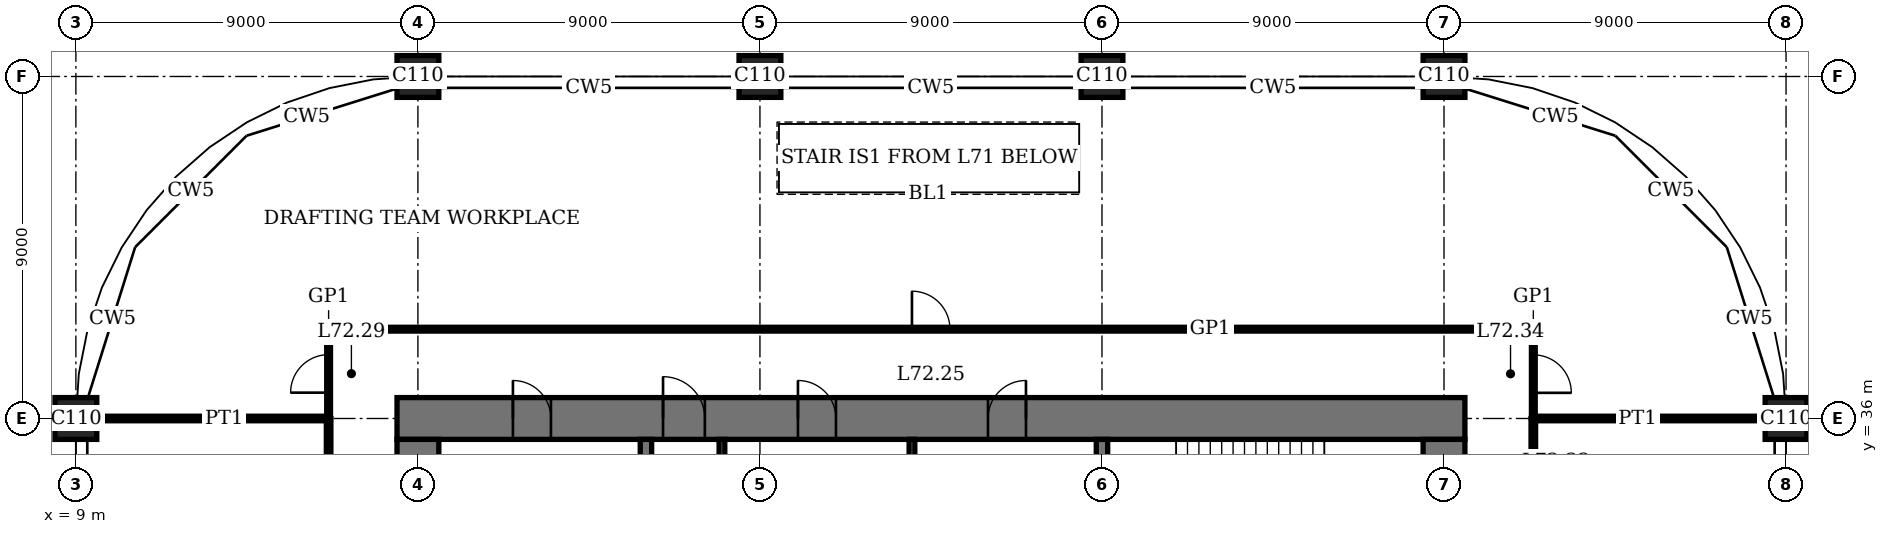
"""IFC4 building model, lengths in metres.
Left out: names, types, materials, properties, quantities, classifications, styles, units other than length and angle.
Written with IfcOpenShell. Run it as: python <this file> out.ifc"""

import sys

from ifc_helpers import new_model, si_unit, direction, frame, frame_2d, origin, origin_2d, place, context, subcontext, project, spatial, rectangle, extrude, element, fill, save


model = new_model("IFC4")
c1 = context("Model", 3, precision=1e-05, world=origin(), true_north=direction((0.0, 1.0)))
c2 = subcontext(c1, "Body", "Model", "MODEL_VIEW")
j1 = project(units=[si_unit("LENGTHUNIT", "METRE"), si_unit("PLANEANGLEUNIT", "RADIAN")], contexts=[c1])
p1 = place(None, origin())
s1 = spatial("IfcSite", under=j1, at=p1, CompositionType="ELEMENT")
p2 = place(p1, origin())
s2 = spatial("IfcBuilding", under=s1, at=p2, CompositionType="ELEMENT")
p3 = place(p2, frame((0.0, 0.0, 295.4)))
s3 = spatial("IfcBuildingStorey", under=s2, at=p3, CompositionType="ELEMENT", Elevation=295.4)
for number, where, z_axis, x_axis in (
    (1, (9.0, 36.0, 0.0), (0.0, 0.0, 1.0), (1.0, 0.0, 0.0)),
    (2, (18.0, 45.0, 0.0), (0.0, 0.0, 1.0), (1.0, 0.0, 0.0)),
    (3, (27.0, 45.0, 0.0), (0.0, 0.0, 1.0), (1.0, 0.0, 0.0)),
    (4, (36.0, 45.0, 0.0), (0.0, 0.0, 1.0), (1.0, 0.0, 0.0)),
    (5, (45.0, 45.0, 0.0), (0.0, 0.0, 1.0), (1.0, 0.0, 0.0)),
    (6, (54.0, 36.0, 0.0), (0.0, 0.0, 1.0), (1.0, 0.0, 0.0)),
):
    element("IfcColumn", number, at=place(p3, frame(where, z_axis=z_axis, x_axis=x_axis)), inside=s3, PredefinedType="COLUMN", context=c2, shape_type="SweptSolid", body=[
        extrude(rectangle(XDim=1.1, YDim=1.1, at=origin_2d()), origin(), (0.0, 0.0, 1.0), 4.0),
    ])
p4 = place(p3, frame((45.55, 36.0, 0.0), z_axis=(0.0, 0.0, 1.0), x_axis=(-1.0, 0.0, 0.0)))
e7 = element("IfcWall", 7, at=p4, inside=s3, PredefinedType="SHEAR", context=c2, shape_type="SweptSolid", body=[
    extrude(rectangle(XDim=28.1, YDim=1.1, at=frame_2d((14.05, 0.0))), origin(), (0.0, 0.0, 1.0), 4.0),
])
p5 = place(p4, frame((11.55, 0.0, 0.0)))
e8 = element("IfcOpeningElement", 8, at=p5, cuts=e7, PredefinedType="OPENING", context=c2, shape_type="SweptSolid", body=[
    extrude(rectangle(XDim=1.0, YDim=2.4, at=frame_2d((0.5, 1.2))), frame((0.0, 0.56, 0.0), z_axis=(0.0, -1.0, 0.0), x_axis=(1.0, 0.0, 0.0)), (0.0, 0.0, 1.0), 1.12),
])
p6 = place(p4, frame((16.55, 0.0, 0.0)))
e9 = element("IfcOpeningElement", 9, at=p6, cuts=e7, PredefinedType="OPENING", context=c2, shape_type="SweptSolid", body=[
    extrude(rectangle(XDim=1.0, YDim=2.4, at=frame_2d((0.5, 1.2))), frame((0.0, 0.56, 0.0), z_axis=(0.0, -1.0, 0.0), x_axis=(1.0, 0.0, 0.0)), (0.0, 0.0, 1.0), 1.12),
])
p7 = place(p4, frame((20.0, 0.0, 0.0)))
e10 = element("IfcOpeningElement", 10, at=p7, cuts=e7, PredefinedType="OPENING", context=c2, shape_type="SweptSolid", body=[
    extrude(rectangle(XDim=1.1, YDim=2.4, at=frame_2d((0.55, 1.2))), frame((0.0, 0.56, 0.0), z_axis=(0.0, -1.0, 0.0), x_axis=(1.0, 0.0, 0.0)), (0.0, 0.0, 1.0), 1.12),
])
p8 = place(p4, frame((24.05, 0.0, 0.0)))
e11 = element("IfcOpeningElement", 11, at=p8, cuts=e7, PredefinedType="OPENING", context=c2, shape_type="SweptSolid", body=[
    extrude(rectangle(XDim=1.0, YDim=2.4, at=frame_2d((0.5, 1.2))), frame((0.0, 0.56, 0.0), z_axis=(0.0, -1.0, 0.0), x_axis=(1.0, 0.0, 0.0)), (0.0, 0.0, 1.0), 1.12),
])
p9 = place(p3, frame((18.0, 35.45, 0.0), z_axis=(0.0, 0.0, 1.0), x_axis=(0.0, -1.0, 0.0)))
e12 = element("IfcWall", 12, at=p9, inside=s3, PredefinedType="SHEAR", context=c2, shape_type="SweptSolid", body=[
    extrude(rectangle(XDim=16.9, YDim=1.1, at=frame_2d((8.45, 0.0))), origin(), (0.0, 0.0, 1.0), 4.0),
])
p10 = place(p9, frame((8.45, 0.0, 0.0)))
e13 = element("IfcOpeningElement", 13, at=p10, cuts=e12, PredefinedType="OPENING", context=c2, shape_type="SweptSolid", body=[
    extrude(rectangle(XDim=1.8, YDim=2.4, at=frame_2d((0.9, 1.2))), frame((0.0, 0.56, 0.0), z_axis=(0.0, -1.0, 0.0), x_axis=(1.0, 0.0, 0.0)), (0.0, 0.0, 1.0), 1.12),
])
p11 = place(p3, frame((45.0, 18.55, 0.0), z_axis=(0.0, 0.0, 1.0), x_axis=(0.0, 1.0, 0.0)))
e14 = element("IfcWall", 14, at=p11, inside=s3, PredefinedType="SHEAR", context=c2, shape_type="SweptSolid", body=[
    extrude(rectangle(XDim=16.9, YDim=1.1, at=frame_2d((8.45, 0.0))), origin(), (0.0, 0.0, 1.0), 4.0),
])
p12 = place(p11, frame((8.45, 0.0, 0.0)))
e15 = element("IfcOpeningElement", 15, at=p12, cuts=e14, PredefinedType="OPENING", context=c2, shape_type="SweptSolid", body=[
    extrude(rectangle(XDim=1.8, YDim=2.4, at=frame_2d((0.9, 1.2))), frame((0.0, 0.56, 0.0), z_axis=(0.0, -1.0, 0.0), x_axis=(1.0, 0.0, 0.0)), (0.0, 0.0, 1.0), 1.12),
])
p13 = place(p3, frame((36.0, 32.4, 0.0), z_axis=(0.0, 0.0, 1.0), x_axis=(0.0, 1.0, 0.0)))
e16 = element("IfcWall", 16, at=p13, inside=s3, PredefinedType="SHEAR", context=c2, shape_type="SweptSolid", body=[
    extrude(rectangle(XDim=3.05, YDim=0.3, at=frame_2d((1.525, 0.0))), origin(), (0.0, 0.0, 1.0), 4.0),
])
p14 = place(p3, frame((24.0, 29.55, 0.0), z_axis=(0.0, 0.0, 1.0), x_axis=(0.0, 1.0, 0.0)))
e17 = element("IfcWall", 17, at=p14, inside=s3, PredefinedType="SHEAR", context=c2, shape_type="SweptSolid", body=[
    extrude(rectangle(XDim=5.9, YDim=0.3, at=frame_2d((2.95, 0.0))), origin(), (0.0, 0.0, 1.0), 4.0),
])
for number, where, z_axis, x_axis in (
    (18, (9.55, 36.0, 0.0), (0.0, 0.0, 1.0), (1.0, 0.0, 0.0)),
    (19, (47.35, 36.0, 0.0), (0.0, 0.0, 1.0), (1.0, 0.0, 0.0)),
):
    element("IfcWall", number, at=place(p3, frame(where, z_axis=z_axis, x_axis=x_axis)), inside=s3, PredefinedType="PARTITIONING", context=c2, shape_type="SweptSolid", body=[
        extrude(rectangle(XDim=6.1, YDim=0.12, at=frame_2d((3.05, 0.0))), origin(), (0.0, 0.0, 1.0), 3.05),
    ])
p15 = place(p3, frame((15.6, 38.35, 0.0), z_axis=(0.0, 0.0, 1.0), x_axis=(1.0, 0.0, 0.0)))
e20 = element("IfcWall", 20, at=p15, inside=s3, PredefinedType="PARTITIONING", context=c2, shape_type="SweptSolid", body=[
    extrude(rectangle(XDim=31.8, YDim=0.1, at=frame_2d((15.9, 0.0))), origin(), (0.0, 0.0, 1.0), 3.75),
])
p16 = place(p15, frame((15.4, 0.0, 0.0)))
e21 = element("IfcOpeningElement", 21, at=p16, cuts=e20, PredefinedType="OPENING", context=c2, shape_type="SweptSolid", body=[
    extrude(rectangle(XDim=1.0, YDim=2.4, at=frame_2d((0.5, 1.2))), frame((0.0, 0.06, 0.0), z_axis=(0.0, -1.0, 0.0), x_axis=(1.0, 0.0, 0.0)), (0.0, 0.0, 1.0), 0.12),
])
p17 = place(p3, frame((15.65, 27.0, 0.0), z_axis=(0.0, 0.0, 1.0), x_axis=(0.0, 1.0, 0.0)))
e22 = element("IfcWall", 22, at=p17, inside=s3, PredefinedType="PARTITIONING", context=c2, shape_type="SweptSolid", body=[
    extrude(rectangle(XDim=9.0, YDim=0.12, at=frame_2d((4.5, 0.0))), origin(), (0.0, 0.0, 1.0), 3.75),
])
p18 = place(p17, frame((4.0, 0.0, 0.0)))
e23 = element("IfcOpeningElement", 23, at=p18, cuts=e22, PredefinedType="OPENING", context=c2, shape_type="SweptSolid", body=[
    extrude(rectangle(XDim=1.0, YDim=2.4, at=frame_2d((0.5, 1.2))), frame((0.0, 0.07, 0.0), z_axis=(0.0, -1.0, 0.0), x_axis=(1.0, 0.0, 0.0)), (0.0, 0.0, 1.0), 0.14),
])
p19 = place(p3, frame((15.65, 36.01, 0.0), z_axis=(0.0, 0.0, 1.0), x_axis=(0.0, 1.0, 0.0)))
e24 = element("IfcWall", 24, at=p19, inside=s3, PredefinedType="PARTITIONING", context=c2, shape_type="SweptSolid", body=[
    extrude(rectangle(XDim=2.34, YDim=0.1, at=frame_2d((1.17, 0.0))), origin(), (0.0, 0.0, 1.0), 3.75),
])
p20 = place(p19, frame((0.67, 0.0, 0.0)))
e25 = element("IfcOpeningElement", 25, at=p20, cuts=e24, PredefinedType="OPENING", context=c2, shape_type="SweptSolid", body=[
    extrude(rectangle(XDim=1.0, YDim=2.4, at=frame_2d((0.5, 1.2))), frame((0.0, 0.06, 0.0), z_axis=(0.0, -1.0, 0.0), x_axis=(1.0, 0.0, 0.0)), (0.0, 0.0, 1.0), 0.12),
])
p21 = place(p3, frame((47.35, 31.5, 0.0), z_axis=(0.0, 0.0, 1.0), x_axis=(0.0, 1.0, 0.0)))
e26 = element("IfcWall", 26, at=p21, inside=s3, PredefinedType="PARTITIONING", context=c2, shape_type="SweptSolid", body=[
    extrude(rectangle(XDim=4.5, YDim=0.12, at=frame_2d((2.25, 0.0))), origin(), (0.0, 0.0, 1.0), 3.75),
])
p22 = place(p21, frame((1.75, 0.0, 0.0)))
e27 = element("IfcOpeningElement", 27, at=p22, cuts=e26, PredefinedType="OPENING", context=c2, shape_type="SweptSolid", body=[
    extrude(rectangle(XDim=1.0, YDim=2.4, at=frame_2d((0.5, 1.2))), frame((0.0, 0.07, 0.0), z_axis=(0.0, -1.0, 0.0), x_axis=(1.0, 0.0, 0.0)), (0.0, 0.0, 1.0), 0.14),
])
p23 = place(p3, frame((47.35, 36.0, 0.0), z_axis=(0.0, 0.0, 1.0), x_axis=(0.0, 1.0, 0.0)))
e28 = element("IfcWall", 28, at=p23, inside=s3, PredefinedType="PARTITIONING", context=c2, shape_type="SweptSolid", body=[
    extrude(rectangle(XDim=2.35, YDim=0.1, at=frame_2d((1.175, 0.0))), origin(), (0.0, 0.0, 1.0), 3.75),
])
p24 = place(p23, frame((0.675, 0.0, 0.0)))
e29 = element("IfcOpeningElement", 29, at=p24, cuts=e28, PredefinedType="OPENING", context=c2, shape_type="SweptSolid", body=[
    extrude(rectangle(XDim=1.0, YDim=2.4, at=frame_2d((0.5, 1.2))), frame((0.0, 0.06, 0.0), z_axis=(0.0, -1.0, 0.0), x_axis=(1.0, 0.0, 0.0)), (0.0, 0.0, 1.0), 0.12),
])
for number, where, z_axis, x_axis in (
    (30, (31.0, 32.55, 0.0), (0.0, 0.0, 1.0), (0.0, 1.0, 0.0)),
    (31, (26.0, 32.55, 0.0), (0.0, 0.0, 1.0), (0.0, 1.0, 0.0)),
):
    element("IfcWall", number, at=place(p3, frame(where, z_axis=z_axis, x_axis=x_axis)), inside=s3, PredefinedType="PARTITIONING", context=c2, shape_type="SweptSolid", body=[
        extrude(rectangle(XDim=2.9, YDim=0.15, at=frame_2d((1.45, 0.0))), origin(), (0.0, 0.0, 1.0), 3.75),
    ])
p25 = place(p5, origin())
e32 = element("IfcDoor", 32, at=p25, inside=s3, OperationType="SINGLE_SWING_LEFT", PredefinedType="DOOR", context=c2, shape_type="SweptSolid", body=[
    extrude(rectangle(XDim=1.0, YDim=2.4, at=frame_2d((0.5, 1.2))), frame((0.0, 0.025, 0.0), z_axis=(0.0, -1.0, 0.0), x_axis=(1.0, 0.0, 0.0)), (0.0, 0.0, 1.0), 0.05),
    extrude(rectangle(XDim=0.04, YDim=2.4, at=frame_2d((0.02, 1.2))), frame((0.0, 0.4, 0.0), z_axis=(0.0, -1.0, 0.0), x_axis=(1.0, 0.0, 0.0)), (0.0, 0.0, 1.0), 0.8),
    extrude(rectangle(XDim=0.04, YDim=2.4, at=frame_2d((0.98, 1.2))), frame((0.0, 0.4, 0.0), z_axis=(0.0, -1.0, 0.0), x_axis=(1.0, 0.0, 0.0)), (0.0, 0.0, 1.0), 0.8),
    extrude(rectangle(XDim=1.0, YDim=0.04, at=frame_2d((0.5, 2.38))), frame((0.0, 0.4, 0.0), z_axis=(0.0, -1.0, 0.0), x_axis=(1.0, 0.0, 0.0)), (0.0, 0.0, 1.0), 0.8),
])
fill(e8, e32)
p26 = place(p6, origin())
e33 = element("IfcDoor", 33, at=p26, inside=s3, OperationType="SINGLE_SWING_RIGHT", PredefinedType="DOOR", context=c2, shape_type="SweptSolid", body=[
    extrude(rectangle(XDim=1.0, YDim=2.4, at=frame_2d((0.5, 1.2))), frame((0.0, 0.025, 0.0), z_axis=(0.0, -1.0, 0.0), x_axis=(1.0, 0.0, 0.0)), (0.0, 0.0, 1.0), 0.05),
    extrude(rectangle(XDim=0.04, YDim=2.4, at=frame_2d((0.02, 1.2))), frame((0.0, 0.4, 0.0), z_axis=(0.0, -1.0, 0.0), x_axis=(1.0, 0.0, 0.0)), (0.0, 0.0, 1.0), 0.8),
    extrude(rectangle(XDim=0.04, YDim=2.4, at=frame_2d((0.98, 1.2))), frame((0.0, 0.4, 0.0), z_axis=(0.0, -1.0, 0.0), x_axis=(1.0, 0.0, 0.0)), (0.0, 0.0, 1.0), 0.8),
    extrude(rectangle(XDim=1.0, YDim=0.04, at=frame_2d((0.5, 2.38))), frame((0.0, 0.4, 0.0), z_axis=(0.0, -1.0, 0.0), x_axis=(1.0, 0.0, 0.0)), (0.0, 0.0, 1.0), 0.8),
])
fill(e9, e33)
p27 = place(p7, origin())
e34 = element("IfcDoor", 34, at=p27, inside=s3, OperationType="SINGLE_SWING_RIGHT", PredefinedType="DOOR", context=c2, shape_type="SweptSolid", body=[
    extrude(rectangle(XDim=1.1, YDim=2.4, at=frame_2d((0.55, 1.2))), frame((0.0, 0.025, 0.0), z_axis=(0.0, -1.0, 0.0), x_axis=(1.0, 0.0, 0.0)), (0.0, 0.0, 1.0), 0.05),
    extrude(rectangle(XDim=0.04, YDim=2.4, at=frame_2d((0.02, 1.2))), frame((0.0, 0.44, 0.0), z_axis=(0.0, -1.0, 0.0), x_axis=(1.0, 0.0, 0.0)), (0.0, 0.0, 1.0), 0.88),
    extrude(rectangle(XDim=0.04, YDim=2.4, at=frame_2d((1.08, 1.2))), frame((0.0, 0.44, 0.0), z_axis=(0.0, -1.0, 0.0), x_axis=(1.0, 0.0, 0.0)), (0.0, 0.0, 1.0), 0.88),
    extrude(rectangle(XDim=1.1, YDim=0.04, at=frame_2d((0.55, 2.38))), frame((0.0, 0.44, 0.0), z_axis=(0.0, -1.0, 0.0), x_axis=(1.0, 0.0, 0.0)), (0.0, 0.0, 1.0), 0.88),
])
fill(e10, e34)
p28 = place(p8, origin())
e35 = element("IfcDoor", 35, at=p28, inside=s3, OperationType="SINGLE_SWING_RIGHT", PredefinedType="DOOR", context=c2, shape_type="SweptSolid", body=[
    extrude(rectangle(XDim=1.0, YDim=2.4, at=frame_2d((0.5, 1.2))), frame((0.0, 0.025, 0.0), z_axis=(0.0, -1.0, 0.0), x_axis=(1.0, 0.0, 0.0)), (0.0, 0.0, 1.0), 0.05),
    extrude(rectangle(XDim=0.04, YDim=2.4, at=frame_2d((0.02, 1.2))), frame((0.0, 0.4, 0.0), z_axis=(0.0, -1.0, 0.0), x_axis=(1.0, 0.0, 0.0)), (0.0, 0.0, 1.0), 0.8),
    extrude(rectangle(XDim=0.04, YDim=2.4, at=frame_2d((0.98, 1.2))), frame((0.0, 0.4, 0.0), z_axis=(0.0, -1.0, 0.0), x_axis=(1.0, 0.0, 0.0)), (0.0, 0.0, 1.0), 0.8),
    extrude(rectangle(XDim=1.0, YDim=0.04, at=frame_2d((0.5, 2.38))), frame((0.0, 0.4, 0.0), z_axis=(0.0, -1.0, 0.0), x_axis=(1.0, 0.0, 0.0)), (0.0, 0.0, 1.0), 0.8),
])
fill(e11, e35)
p29 = place(p16, origin())
e36 = element("IfcDoor", 36, at=p29, inside=s3, OperationType="SINGLE_SWING_RIGHT", PredefinedType="DOOR", context=c2, shape_type="SweptSolid", body=[
    extrude(rectangle(XDim=1.0, YDim=2.4, at=frame_2d((0.5, 1.2))), frame((0.0, 0.02, 0.0), z_axis=(0.0, -1.0, 0.0), x_axis=(1.0, 0.0, 0.0)), (0.0, 0.0, 1.0), 0.04),
])
fill(e21, e36)
p30 = place(p20, origin())
e37 = element("IfcDoor", 37, at=p30, inside=s3, OperationType="SINGLE_SWING_RIGHT", PredefinedType="DOOR", context=c2, shape_type="SweptSolid", body=[
    extrude(rectangle(XDim=1.0, YDim=2.4, at=frame_2d((0.5, 1.2))), frame((0.0, 0.02, 0.0), z_axis=(0.0, -1.0, 0.0), x_axis=(1.0, 0.0, 0.0)), (0.0, 0.0, 1.0), 0.04),
])
fill(e25, e37)
p31 = place(p24, origin())
e38 = element("IfcDoor", 38, at=p31, inside=s3, OperationType="SINGLE_SWING_LEFT", PredefinedType="DOOR", context=c2, shape_type="SweptSolid", body=[
    extrude(rectangle(XDim=1.0, YDim=2.4, at=frame_2d((0.5, 1.2))), frame((0.0, 0.02, 0.0), z_axis=(0.0, -1.0, 0.0), x_axis=(1.0, 0.0, 0.0)), (0.0, 0.0, 1.0), 0.04),
])
fill(e29, e38)
save(model, sys.argv[1])
